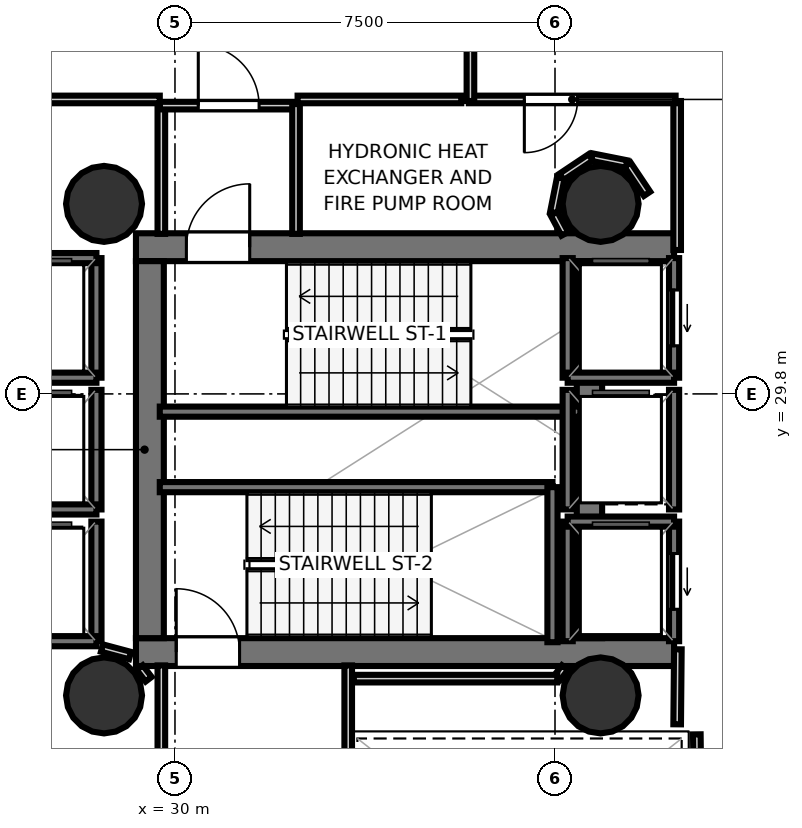
"""IFC4 building model, lengths in metres.
Left out: names, types, materials, properties, quantities, classifications, styles, units other than length and angle.
Written with IfcOpenShell. Run it as: python <this file> out.ifc"""

import sys

from ifc_helpers import new_model, si_unit, direction, frame, frame_2d, origin, origin_2d, place, context, subcontext, project, spatial, rectangle, hollow_circle, extrude, element, fill, save


model = new_model("IFC4")
c1 = context("Model", 3, precision=1e-05, world=origin(), true_north=direction((0.0, 1.0)))
c2 = subcontext(c1, "Body", "Model", "MODEL_VIEW")
j1 = project(units=[si_unit("LENGTHUNIT", "METRE"), si_unit("PLANEANGLEUNIT", "RADIAN")], contexts=[c1])
p1 = place(None, origin())
s1 = spatial("IfcSite", under=j1, at=p1, CompositionType="ELEMENT")
p2 = place(p1, origin())
s2 = spatial("IfcBuilding", under=s1, at=p2, CompositionType="ELEMENT")
p3 = place(p2, frame((0.0, 0.0, 138.5)))
s3 = spatial("IfcBuildingStorey", under=s2, at=p3, CompositionType="ELEMENT", Elevation=138.5)
p4 = place(p3, frame((29.23, 32.695, 0.0), z_axis=(0.0, 0.0, 1.0), x_axis=(1.0, 0.0, 0.0)))
e1 = element("IfcWall", 1, at=p4, inside=s3, PredefinedType="SHEAR", context=c2, shape_type="SweptSolid", body=[
    extrude(rectangle(XDim=10.62, YDim=0.55, at=frame_2d((5.31, 0.0))), origin(), (0.0, 0.0, 1.0), 4.38),
])
p5 = place(p4, frame((0.995, 0.0, 0.0)))
e2 = element("IfcOpeningElement", 2, at=p5, cuts=e1, PredefinedType="OPENING", context=c2, shape_type="SweptSolid", body=[
    extrude(rectangle(XDim=1.25, YDim=2.15, at=frame_2d((0.625, 1.075))), frame((0.0, 0.285, 0.0), z_axis=(0.0, -1.0, 0.0), x_axis=(1.0, 0.0, 0.0)), (0.0, 0.0, 1.0), 0.57),
])
p6 = place(p3, frame((29.23, 24.705, 0.0), z_axis=(0.0, 0.0, 1.0), x_axis=(1.0, 0.0, 0.0)))
e3 = element("IfcWall", 3, at=p6, inside=s3, PredefinedType="SHEAR", context=c2, shape_type="SweptSolid", body=[
    extrude(rectangle(XDim=10.62, YDim=0.55, at=frame_2d((5.31, 0.0))), origin(), (0.0, 0.0, 1.0), 4.38),
])
p7 = place(p6, frame((0.795, 0.0, 0.0)))
e4 = element("IfcOpeningElement", 4, at=p7, cuts=e3, PredefinedType="OPENING", context=c2, shape_type="SweptSolid", body=[
    extrude(rectangle(XDim=1.25, YDim=2.15, at=frame_2d((0.625, 1.075))), frame((0.0, 0.285, 0.0), z_axis=(0.0, -1.0, 0.0), x_axis=(1.0, 0.0, 0.0)), (0.0, 0.0, 1.0), 0.57),
])
p8 = place(p3, frame((29.505, 24.98, 0.0), z_axis=(0.0, 0.0, 1.0), x_axis=(0.0, 1.0, 0.0)))
e5 = element("IfcWall", 5, at=p8, inside=s3, PredefinedType="SHEAR", context=c2, shape_type="SweptSolid", body=[
    extrude(rectangle(XDim=7.44, YDim=0.55, at=frame_2d((3.72, 0.0))), origin(), (0.0, 0.0, 1.0), 4.38),
])
p9 = place(p3, frame((38.18, 24.98, 0.0), z_axis=(0.0, 0.0, 1.0), x_axis=(0.0, 1.0, 0.0)))
e6 = element("IfcWall", 6, at=p9, inside=s3, PredefinedType="SHEAR", context=c2, shape_type="SweptSolid", body=[
    extrude(rectangle(XDim=7.44, YDim=0.5, at=frame_2d((3.72, 0.0))), origin(), (0.0, 0.0, 1.0), 4.38),
])
for number, where, z_axis, x_axis in (
    (7, (28.6, 33.55, 0.0), (0.0, 0.0, 1.0), (1.0, 0.0, 0.0)),
    (8, (28.6, 23.85, 0.0), (0.0, 0.0, 1.0), (1.0, 0.0, 0.0)),
    (9, (38.4, 33.55, 0.0), (0.0, 0.0, 1.0), (1.0, 0.0, 0.0)),
    (10, (38.4, 23.85, 0.0), (0.0, 0.0, 1.0), (1.0, 0.0, 0.0)),
):
    element("IfcColumn", number, at=place(p3, frame(where, z_axis=z_axis, x_axis=x_axis)), inside=s3, PredefinedType="COLUMN", context=c2, shape_type="SweptSolid", body=[
        extrude(hollow_circle(Radius=0.75, WallThickness=0.036, at=origin_2d()), origin(), (0.0, 0.0, 1.0), 4.6),
    ])
p10 = place(p3, frame((29.7, 29.45, 0.0), z_axis=(0.0, 0.0, 1.0), x_axis=(1.0, 0.0, 0.0)))
e11 = element("IfcWall", 11, at=p10, inside=s3, PredefinedType="SOLIDWALL", context=c2, shape_type="SweptSolid", body=[
    extrude(rectangle(XDim=8.3, YDim=0.2, at=frame_2d((4.15, 0.0))), origin(), (0.0, 0.0, 1.0), 4.38),
])
p11 = place(p3, frame((29.7, 27.96, 0.0), z_axis=(0.0, 0.0, 1.0), x_axis=(1.0, 0.0, 0.0)))
e12 = element("IfcWall", 12, at=p11, inside=s3, PredefinedType="SOLIDWALL", context=c2, shape_type="SweptSolid", body=[
    extrude(rectangle(XDim=7.75, YDim=0.2, at=frame_2d((3.875, 0.0))), origin(), (0.0, 0.0, 1.0), 4.38),
])
p12 = place(p3, frame((37.45, 24.9, 0.0), z_axis=(0.0, 0.0, 1.0), x_axis=(0.0, 1.0, 0.0)))
e13 = element("IfcWall", 13, at=p12, inside=s3, PredefinedType="SOLIDWALL", context=c2, shape_type="SweptSolid", body=[
    extrude(rectangle(XDim=3.06, YDim=0.2, at=frame_2d((1.53, 0.0))), origin(), (0.0, 0.0, 1.0), 4.38),
])
p13 = place(p3, frame((39.85, 30.12, 0.0), z_axis=(0.0, 0.0, 1.0), x_axis=(0.0, 1.0, 0.0)))
e14 = element("IfcWall", 14, at=p13, inside=s3, PredefinedType="SOLIDWALL", context=c2, shape_type="SweptSolid", body=[
    extrude(rectangle(XDim=2.36, YDim=0.2, at=frame_2d((1.18, 0.0))), origin(), (0.0, 0.0, 1.0), 4.38),
])
p14 = place(p13, frame((0.63, 0.0, 0.0)))
e15 = element("IfcOpeningElement", 15, at=p14, cuts=e14, PredefinedType="OPENING", context=c2, shape_type="SweptSolid", body=[
    extrude(rectangle(XDim=1.1, YDim=2.15, at=frame_2d((0.55, 1.075))), frame((0.0, 0.11, 0.0), z_axis=(0.0, -1.0, 0.0), x_axis=(1.0, 0.0, 0.0)), (0.0, 0.0, 1.0), 0.22),
])
p15 = place(p3, frame((37.75, 30.12, 0.0), z_axis=(0.0, 0.0, 1.0), x_axis=(0.0, 1.0, 0.0)))
e16 = element("IfcWall", 16, at=p15, inside=s3, PredefinedType="SOLIDWALL", context=c2, shape_type="SweptSolid", body=[
    extrude(rectangle(XDim=2.36, YDim=0.2, at=frame_2d((1.18, 0.0))), origin(), (0.0, 0.0, 1.0), 4.38),
])
p16 = place(p3, frame((37.75, 30.12, 0.0), z_axis=(0.0, 0.0, 1.0), x_axis=(1.0, 0.0, 0.0)))
e17 = element("IfcWall", 17, at=p16, inside=s3, PredefinedType="SOLIDWALL", context=c2, shape_type="SweptSolid", body=[
    extrude(rectangle(XDim=2.1, YDim=0.2, at=frame_2d((1.05, 0.0))), origin(), (0.0, 0.0, 1.0), 4.38),
])
p17 = place(p3, frame((39.85, 24.92, 0.0), z_axis=(0.0, 0.0, 1.0), x_axis=(0.0, 1.0, 0.0)))
e18 = element("IfcWall", 18, at=p17, inside=s3, PredefinedType="SOLIDWALL", context=c2, shape_type="SweptSolid", body=[
    extrude(rectangle(XDim=2.36, YDim=0.2, at=frame_2d((1.18, 0.0))), origin(), (0.0, 0.0, 1.0), 4.38),
])
p18 = place(p17, frame((0.63, 0.0, 0.0)))
e19 = element("IfcOpeningElement", 19, at=p18, cuts=e18, PredefinedType="OPENING", context=c2, shape_type="SweptSolid", body=[
    extrude(rectangle(XDim=1.1, YDim=2.15, at=frame_2d((0.55, 1.075))), frame((0.0, 0.11, 0.0), z_axis=(0.0, -1.0, 0.0), x_axis=(1.0, 0.0, 0.0)), (0.0, 0.0, 1.0), 0.22),
])
p19 = place(p3, frame((37.75, 24.92, 0.0), z_axis=(0.0, 0.0, 1.0), x_axis=(0.0, 1.0, 0.0)))
e20 = element("IfcWall", 20, at=p19, inside=s3, PredefinedType="SOLIDWALL", context=c2, shape_type="SweptSolid", body=[
    extrude(rectangle(XDim=2.36, YDim=0.2, at=frame_2d((1.18, 0.0))), origin(), (0.0, 0.0, 1.0), 4.38),
])
p20 = place(p3, frame((37.75, 27.28, 0.0), z_axis=(0.0, 0.0, 1.0), x_axis=(1.0, 0.0, 0.0)))
e21 = element("IfcWall", 21, at=p20, inside=s3, PredefinedType="SOLIDWALL", context=c2, shape_type="SweptSolid", body=[
    extrude(rectangle(XDim=2.1, YDim=0.2, at=frame_2d((1.05, 0.0))), origin(), (0.0, 0.0, 1.0), 4.38),
])
p21 = place(p3, frame((28.45, 30.12, 0.0), z_axis=(0.0, 0.0, 1.0), x_axis=(0.0, 1.0, 0.0)))
e22 = element("IfcWall", 22, at=p21, inside=s3, PredefinedType="SOLIDWALL", context=c2, shape_type="SweptSolid", body=[
    extrude(rectangle(XDim=2.36, YDim=0.2, at=frame_2d((1.18, 0.0))), origin(), (0.0, 0.0, 1.0), 4.38),
])
for number, where, z_axis, x_axis in (
    (23, (26.35, 32.48, 0.0), (0.0, 0.0, 1.0), (1.0, 0.0, 0.0)),
    (24, (26.35, 30.12, 0.0), (0.0, 0.0, 1.0), (1.0, 0.0, 0.0)),
):
    element("IfcWall", number, at=place(p3, frame(where, z_axis=z_axis, x_axis=x_axis)), inside=s3, PredefinedType="SOLIDWALL", context=c2, shape_type="SweptSolid", body=[
        extrude(rectangle(XDim=2.1, YDim=0.2, at=frame_2d((1.05, 0.0))), origin(), (0.0, 0.0, 1.0), 4.38),
    ])
p22 = place(p3, frame((28.45, 27.52, 0.0), z_axis=(0.0, 0.0, 1.0), x_axis=(0.0, 1.0, 0.0)))
e25 = element("IfcWall", 25, at=p22, inside=s3, PredefinedType="SOLIDWALL", context=c2, shape_type="SweptSolid", body=[
    extrude(rectangle(XDim=2.36, YDim=0.2, at=frame_2d((1.18, 0.0))), origin(), (0.0, 0.0, 1.0), 4.38),
])
p23 = place(p3, frame((26.35, 27.52, 0.0), z_axis=(0.0, 0.0, 1.0), x_axis=(1.0, 0.0, 0.0)))
e26 = element("IfcWall", 26, at=p23, inside=s3, PredefinedType="SOLIDWALL", context=c2, shape_type="SweptSolid", body=[
    extrude(rectangle(XDim=2.1, YDim=0.2, at=frame_2d((1.05, 0.0))), origin(), (0.0, 0.0, 1.0), 4.38),
])
p24 = place(p3, frame((28.45, 24.92, 0.0), z_axis=(0.0, 0.0, 1.0), x_axis=(0.0, 1.0, 0.0)))
e27 = element("IfcWall", 27, at=p24, inside=s3, PredefinedType="SOLIDWALL", context=c2, shape_type="SweptSolid", body=[
    extrude(rectangle(XDim=2.36, YDim=0.2, at=frame_2d((1.18, 0.0))), origin(), (0.0, 0.0, 1.0), 4.38),
])
p25 = place(p3, frame((26.35, 24.92, 0.0), z_axis=(0.0, 0.0, 1.0), x_axis=(1.0, 0.0, 0.0)))
e28 = element("IfcWall", 28, at=p25, inside=s3, PredefinedType="SOLIDWALL", context=c2, shape_type="SweptSolid", body=[
    extrude(rectangle(XDim=2.1, YDim=0.2, at=frame_2d((1.05, 0.0))), origin(), (0.0, 0.0, 1.0), 4.38),
])
for number, where, z_axis, x_axis in (
    (29, (39.85, 27.52, 0.0), (0.0, 0.0, 1.0), (0.0, 1.0, 0.0)),
    (30, (37.75, 27.52, 0.0), (0.0, 0.0, 1.0), (0.0, 1.0, 0.0)),
):
    element("IfcWall", number, at=place(p3, frame(where, z_axis=z_axis, x_axis=x_axis)), inside=s3, PredefinedType="SOLIDWALL", context=c2, shape_type="SweptSolid", body=[
        extrude(rectangle(XDim=2.36, YDim=0.2, at=frame_2d((1.18, 0.0))), origin(), (0.0, 0.0, 1.0), 4.38),
    ])
p26 = place(p3, frame((29.731, 32.958, 0.0), z_axis=(0.0, 0.0, 1.0), x_axis=(0.0, 1.0, 0.0)))
e31 = element("IfcWall", 31, at=p26, inside=s3, PredefinedType="PARTITIONING", context=c2, shape_type="SweptSolid", body=[
    extrude(rectangle(XDim=2.562, YDim=0.15, at=frame_2d((1.281, 0.0))), origin(), (0.0, 0.0, 1.0), 2.9),
])
p27 = place(p3, frame((29.7, 35.489, 0.0), z_axis=(0.0, 0.0, 1.0), x_axis=(1.0, 0.0, 0.0)))
e32 = element("IfcWall", 32, at=p27, inside=s3, PredefinedType="PARTITIONING", context=c2, shape_type="SweptSolid", body=[
    extrude(rectangle(XDim=2.72, YDim=0.15, at=frame_2d((1.36, 0.0))), origin(), (0.0, 0.0, 1.0), 2.9),
])
p28 = place(p27, frame((0.76, 0.0, 0.0)))
e33 = element("IfcOpeningElement", 33, at=p28, cuts=e32, PredefinedType="OPENING", context=c2, shape_type="SweptSolid", body=[
    extrude(rectangle(XDim=1.2, YDim=2.15, at=frame_2d((0.6, 1.075))), frame((0.0, 0.085, 0.0), z_axis=(0.0, -1.0, 0.0), x_axis=(1.0, 0.0, 0.0)), (0.0, 0.0, 1.0), 0.17),
])
p29 = place(p3, frame((32.389, 35.52, 0.0), z_axis=(0.0, 0.0, 1.0), x_axis=(0.0, -1.0, 0.0)))
e34 = element("IfcWall", 34, at=p29, inside=s3, PredefinedType="PARTITIONING", context=c2, shape_type="SweptSolid", body=[
    extrude(rectangle(XDim=2.562, YDim=0.15, at=frame_2d((1.281, 0.0))), origin(), (0.0, 0.0, 1.0), 2.9),
])
for number, where, z_axis, x_axis in (
    (35, (29.731, 21.85, 0.0), (0.0, 0.0, 1.0), (0.0, 1.0, 0.0)),
    (36, (33.419, 24.442, 0.0), (0.0, 0.0, 1.0), (0.0, -1.0, 0.0)),
):
    element("IfcWall", number, at=place(p3, frame(where, z_axis=z_axis, x_axis=x_axis)), inside=s3, PredefinedType="PARTITIONING", context=c2, shape_type="SweptSolid", body=[
        extrude(rectangle(XDim=2.592, YDim=0.15, at=frame_2d((1.296, 0.0))), origin(), (0.0, 0.0, 1.0), 2.9),
    ])
p30 = place(p3, frame((39.911, 32.64, 0.0), z_axis=(0.0, 0.0, 1.0), x_axis=(0.0, 1.0, 0.0)))
e37 = element("IfcWall", 37, at=p30, inside=s3, PredefinedType="PARTITIONING", context=c2, shape_type="SweptSolid", body=[
    extrude(rectangle(XDim=2.94, YDim=0.15, at=frame_2d((1.47, 0.0))), origin(), (0.0, 0.0, 1.0), 2.9),
])
p31 = place(p3, frame((39.88, 35.611, 0.0), z_axis=(0.0, 0.0, 1.0), x_axis=(-1.0, 0.0, 0.0)))
e38 = element("IfcWall", 38, at=p31, inside=s3, PredefinedType="PARTITIONING", context=c2, shape_type="SweptSolid", body=[
    extrude(rectangle(XDim=4.08, YDim=0.15, at=frame_2d((2.04, 0.0))), origin(), (0.0, 0.0, 1.0), 2.9),
])
p32 = place(p31, frame((1.935, 0.0, 0.0)))
e39 = element("IfcOpeningElement", 39, at=p32, cuts=e38, PredefinedType="OPENING", context=c2, shape_type="SweptSolid", body=[
    extrude(rectangle(XDim=1.05, YDim=2.15, at=frame_2d((0.525, 1.075))), frame((0.0, 0.085, 0.0), z_axis=(0.0, -1.0, 0.0), x_axis=(1.0, 0.0, 0.0)), (0.0, 0.0, 1.0), 0.17),
])
p33 = place(p3, frame((35.831, 35.58, 0.0), z_axis=(0.0, 0.0, 1.0), x_axis=(0.0, 1.0, 0.0)))
e40 = element("IfcWall", 40, at=p33, inside=s3, PredefinedType="PARTITIONING", context=c2, shape_type="SweptSolid", body=[
    extrude(rectangle(XDim=1.27, YDim=0.15, at=frame_2d((0.635, 0.0))), origin(), (0.0, 0.0, 1.0), 2.9),
])
p34 = place(p3, frame((40.311, 22.05, 0.0), z_axis=(0.0, 0.0, 1.0), x_axis=(-0.011836292006, 0.999929948642, 0.0)))
e41 = element("IfcWall", 41, at=p34, inside=s3, PredefinedType="PARTITIONING", context=c2, shape_type="SweptSolid", body=[
    extrude(rectangle(XDim=1.031, YDim=0.15, at=frame_2d((0.516, 0.0))), origin(), (0.0, 0.0, 1.0), 2.9),
])
p35 = place(p3, frame((39.911, 23.28, 0.0), z_axis=(0.0, 0.0, 1.0), x_axis=(0.009397771291, 0.999955839972, 0.0)))
e42 = element("IfcWall", 42, at=p35, inside=s3, PredefinedType="PARTITIONING", context=c2, shape_type="SweptSolid", body=[
    extrude(rectangle(XDim=1.481, YDim=0.15, at=frame_2d((0.74, 0.0))), origin(), (0.0, 0.0, 1.0), 2.9),
])
p36 = place(p3, frame((29.48, 24.169, 0.0), z_axis=(0.0, 0.0, 1.0), x_axis=(-0.608043045279, 0.79390405912, 0.0)))
e43 = element("IfcWall", 43, at=p36, inside=s3, PredefinedType="PARTITIONING", context=c2, shape_type="SweptSolid", body=[
    extrude(rectangle(XDim=0.29, YDim=0.15, at=frame_2d((0.145, 0.0))), origin(), (0.0, 0.0, 1.0), 2.9),
])
p37 = place(p3, frame((29.114, 24.637, 0.0), z_axis=(0.0, 0.0, 1.0), x_axis=(-0.966199685486, 0.257794817183, 0.0)))
e44 = element("IfcWall", 44, at=p37, inside=s3, PredefinedType="PARTITIONING", context=c2, shape_type="SweptSolid", body=[
    extrude(rectangle(XDim=0.575, YDim=0.15, at=frame_2d((0.288, 0.0))), origin(), (0.0, 0.0, 1.0), 2.9),
])
p38 = place(p3, frame((37.697, 24.399, 0.0), z_axis=(0.0, 0.0, 1.0), x_axis=(-0.60763139403, -0.794219169367, 0.0)))
e45 = element("IfcWall", 45, at=p38, inside=s3, PredefinedType="PARTITIONING", context=c2, shape_type="SweptSolid", body=[
    extrude(rectangle(XDim=0.25, YDim=0.15, at=frame_2d((0.125, 0.0))), origin(), (0.0, 0.0, 1.0), 2.9),
])
p39 = place(p3, frame((37.545, 24.181, 0.0), z_axis=(0.0, 0.0, 1.0), x_axis=(-1.0, 0.0, 0.0)))
e46 = element("IfcWall", 46, at=p39, inside=s3, PredefinedType="PARTITIONING", context=c2, shape_type="SweptSolid", body=[
    extrude(rectangle(XDim=4.015, YDim=0.15, at=frame_2d((2.007, 0.0))), origin(), (0.0, 0.0, 1.0), 2.9),
])
p40 = place(p3, frame((35.65, 35.611, 0.0), z_axis=(0.0, 0.0, 1.0), x_axis=(-1.0, 0.0, 0.0)))
e47 = element("IfcWall", 47, at=p40, inside=s3, PredefinedType="PARTITIONING", context=c2, shape_type="SweptSolid", body=[
    extrude(rectangle(XDim=3.23, YDim=0.15, at=frame_2d((1.615, 0.0))), origin(), (0.0, 0.0, 1.0), 2.9),
])
p41 = place(p3, frame((29.7, 35.611, 0.0), z_axis=(0.0, 0.0, 1.0), x_axis=(-1.0, 0.0, 0.0)))
e48 = element("IfcWall", 48, at=p41, inside=s3, PredefinedType="PARTITIONING", context=c2, shape_type="SweptSolid", body=[
    extrude(rectangle(XDim=3.25, YDim=0.15, at=frame_2d((1.625, 0.0))), origin(), (0.0, 0.0, 1.0), 2.9),
])
p42 = place(p3, frame((39.317, 33.748, 0.0), z_axis=(0.0, 0.0, 1.0), x_axis=(-0.556649926744, 0.830747169153, 0.0)))
e49 = element("IfcWall", 49, at=p42, inside=s3, PredefinedType="PARTITIONING", context=c2, shape_type="SweptSolid", body=[
    extrude(rectangle(XDim=0.693, YDim=0.15, at=frame_2d((0.346, 0.0))), origin(), (0.0, 0.0, 1.0), 2.9),
])
p43 = place(p3, frame((38.912, 34.337, 0.0), z_axis=(0.0, 0.0, 1.0), x_axis=(-0.98075554424, 0.195239756305, 0.0)))
e50 = element("IfcWall", 50, at=p43, inside=s3, PredefinedType="PARTITIONING", context=c2, shape_type="SweptSolid", body=[
    extrude(rectangle(XDim=0.697, YDim=0.15, at=frame_2d((0.348, 0.0))), origin(), (0.0, 0.0, 1.0), 2.9),
])
p44 = place(p3, frame((38.205, 34.468, 0.0), z_axis=(0.0, 0.0, 1.0), x_axis=(-0.831348365513, -0.555751648814, 0.0)))
e51 = element("IfcWall", 51, at=p44, inside=s3, PredefinedType="PARTITIONING", context=c2, shape_type="SweptSolid", body=[
    extrude(rectangle(XDim=0.696, YDim=0.15, at=frame_2d((0.348, 0.0))), origin(), (0.0, 0.0, 1.0), 2.9),
])
p45 = place(p3, frame((37.613, 34.062, 0.0), z_axis=(0.0, 0.0, 1.0), x_axis=(-0.195239756305, -0.98075554424, 0.0)))
e52 = element("IfcWall", 52, at=p45, inside=s3, PredefinedType="PARTITIONING", context=c2, shape_type="SweptSolid", body=[
    extrude(rectangle(XDim=0.697, YDim=0.15, at=frame_2d((0.348, 0.0))), origin(), (0.0, 0.0, 1.0), 2.9),
])
p46 = place(p3, frame((37.48, 33.358, 0.0), z_axis=(0.0, 0.0, 1.0), x_axis=(0.471593841364, -0.881815881455, 0.0)))
e53 = element("IfcWall", 53, at=p46, inside=s3, PredefinedType="PARTITIONING", context=c2, shape_type="SweptSolid", body=[
    extrude(rectangle(XDim=0.454, YDim=0.15, at=frame_2d((0.227, 0.0))), origin(), (0.0, 0.0, 1.0), 2.9),
])
p47 = place(p5, origin())
e54 = element("IfcDoor", 54, at=p47, inside=s3, OperationType="SINGLE_SWING_RIGHT", PredefinedType="DOOR", context=c2, shape_type="SweptSolid", body=[
    extrude(rectangle(XDim=1.25, YDim=2.15, at=frame_2d((0.625, 1.075))), frame((0.0, 0.025, 0.0), z_axis=(0.0, -1.0, 0.0), x_axis=(1.0, 0.0, 0.0)), (0.0, 0.0, 1.0), 0.05),
])
fill(e2, e54)
p48 = place(p7, origin())
e55 = element("IfcDoor", 55, at=p48, inside=s3, OperationType="SINGLE_SWING_LEFT", PredefinedType="DOOR", context=c2, shape_type="SweptSolid", body=[
    extrude(rectangle(XDim=1.25, YDim=2.15, at=frame_2d((0.625, 1.075))), frame((0.0, 0.025, 0.0), z_axis=(0.0, -1.0, 0.0), x_axis=(1.0, 0.0, 0.0)), (0.0, 0.0, 1.0), 0.05),
])
fill(e4, e55)
p49 = place(p14, origin())
e56 = element("IfcDoor", 56, at=p49, inside=s3, OperationType="SLIDING_TO_LEFT", PredefinedType="DOOR", context=c2, shape_type="SweptSolid", body=[
    extrude(rectangle(XDim=1.1, YDim=2.15, at=frame_2d((0.55, 1.075))), frame((0.0, 0.025, 0.0), z_axis=(0.0, -1.0, 0.0), x_axis=(1.0, 0.0, 0.0)), (0.0, 0.0, 1.0), 0.05),
])
fill(e15, e56)
p50 = place(p18, origin())
e57 = element("IfcDoor", 57, at=p50, inside=s3, OperationType="SLIDING_TO_LEFT", PredefinedType="DOOR", context=c2, shape_type="SweptSolid", body=[
    extrude(rectangle(XDim=1.1, YDim=2.15, at=frame_2d((0.55, 1.075))), frame((0.0, 0.025, 0.0), z_axis=(0.0, -1.0, 0.0), x_axis=(1.0, 0.0, 0.0)), (0.0, 0.0, 1.0), 0.05),
])
fill(e19, e57)
p51 = place(p28, origin())
e58 = element("IfcDoor", 58, at=p51, inside=s3, OperationType="SINGLE_SWING_LEFT", PredefinedType="DOOR", context=c2, shape_type="SweptSolid", body=[
    extrude(rectangle(XDim=1.2, YDim=2.15, at=frame_2d((0.6, 1.075))), frame((0.0, 0.025, 0.0), z_axis=(0.0, -1.0, 0.0), x_axis=(1.0, 0.0, 0.0)), (0.0, 0.0, 1.0), 0.05),
])
fill(e33, e58)
p52 = place(p32, origin())
e59 = element("IfcDoor", 59, at=p52, inside=s3, OperationType="SINGLE_SWING_RIGHT", PredefinedType="DOOR", context=c2, shape_type="SweptSolid", body=[
    extrude(rectangle(XDim=1.05, YDim=2.15, at=frame_2d((0.525, 1.075))), frame((0.0, 0.025, 0.0), z_axis=(0.0, -1.0, 0.0), x_axis=(1.0, 0.0, 0.0)), (0.0, 0.0, 1.0), 0.05),
])
fill(e39, e59)
save(model, sys.argv[1])
